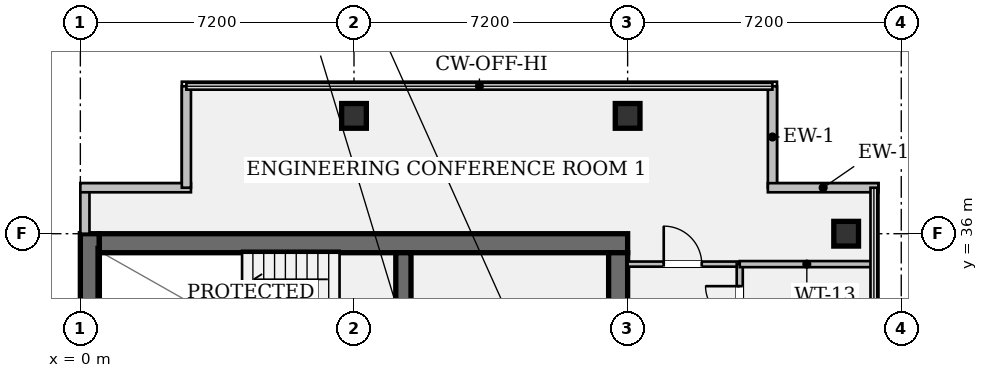
"""IFC4 building model, lengths in metres.
Left out: names, types, materials, properties, quantities, classifications, styles, units other than length and angle.
Written with IfcOpenShell. Run it as: python <this file> out.ifc"""

import sys

from ifc_helpers import new_model, si_unit, direction, frame, frame_2d, origin, origin_2d, place, context, subcontext, project, spatial, rectangle, hollow_rectangle, extrude, element, fill, save


model = new_model("IFC4")
c1 = context("Model", 3, precision=1e-05, world=origin(), true_north=direction((0.0, 1.0)))
c2 = subcontext(c1, "Body", "Model", "MODEL_VIEW")
j1 = project(units=[si_unit("LENGTHUNIT", "METRE"), si_unit("PLANEANGLEUNIT", "RADIAN")], contexts=[c1])
p1 = place(None, origin())
s1 = spatial("IfcSite", under=j1, at=p1, CompositionType="ELEMENT")
p2 = place(p1, origin())
s2 = spatial("IfcBuilding", under=s1, at=p2, CompositionType="ELEMENT")
p3 = place(p2, frame((0.0, 0.0, 283.15)))
s3 = spatial("IfcBuildingStorey", under=s2, at=p3, CompositionType="ELEMENT", Elevation=283.15)
p4 = place(p3, frame((0.25, 7.2, 0.0), z_axis=(0.0, 0.0, 1.0), x_axis=(0.0, 1.0, 0.0)))
e1 = element("IfcWall", 1, at=p4, inside=s3, PredefinedType="SHEAR", context=c2, shape_type="SweptSolid", body=[
    extrude(rectangle(XDim=28.8, YDim=0.5, at=frame_2d((14.4, 0.0))), origin(), (0.0, 0.0, 1.0), 3.24),
])
p5 = place(p3, frame((0.5, 35.75, 0.0), z_axis=(0.0, 0.0, 1.0), x_axis=(1.0, 0.0, 0.0)))
e2 = element("IfcWall", 2, at=p5, inside=s3, PredefinedType="SHEAR", context=c2, shape_type="SweptSolid", body=[
    extrude(rectangle(XDim=13.9, YDim=0.5, at=frame_2d((6.95, 0.0))), origin(), (0.0, 0.0, 1.0), 3.24),
])
p6 = place(p3, frame((14.15, 35.5, 0.0), z_axis=(0.0, 0.0, 1.0), x_axis=(0.0, -1.0, 0.0)))
e3 = element("IfcWall", 3, at=p6, inside=s3, PredefinedType="SHEAR", context=c2, shape_type="SweptSolid", body=[
    extrude(rectangle(XDim=27.8, YDim=0.5, at=frame_2d((13.9, 0.0))), origin(), (0.0, 0.0, 1.0), 3.24),
])
p7 = place(p6, frame((1.4, 0.0, 0.0)))
e4 = element("IfcOpeningElement", 4, at=p7, cuts=e3, PredefinedType="OPENING", context=c2, shape_type="SweptSolid", body=[
    extrude(rectangle(XDim=1.2, YDim=2.15, at=frame_2d((0.6, 1.075))), frame((0.0, 0.262, 0.0), z_axis=(0.0, -1.0, 0.0), x_axis=(1.0, 0.0, 0.0)), (0.0, 0.0, 1.0), 0.524),
])
p8 = place(p6, frame((25.35, 0.0, 0.0)))
e5 = element("IfcOpeningElement", 5, at=p8, cuts=e3, PredefinedType="OPENING", context=c2, shape_type="SweptSolid", body=[
    extrude(rectangle(XDim=1.2, YDim=2.15, at=frame_2d((0.6, 1.075))), frame((0.0, 0.262, 0.0), z_axis=(0.0, -1.0, 0.0), x_axis=(1.0, 0.0, 0.0)), (0.0, 0.0, 1.0), 0.524),
])
p9 = place(p6, frame((14.7, 0.0, 0.0)))
e6 = element("IfcOpeningElement", 6, at=p9, cuts=e3, PredefinedType="OPENING", context=c2, shape_type="SweptSolid", body=[
    extrude(rectangle(XDim=1.6, YDim=2.2, at=frame_2d((0.8, 1.1))), frame((0.0, 0.262, 0.0), z_axis=(0.0, -1.0, 0.0), x_axis=(1.0, 0.0, 0.0)), (0.0, 0.0, 1.0), 0.524),
])
p10 = place(p3, frame((8.5, 31.72, 0.0), z_axis=(0.0, 0.0, 1.0), x_axis=(0.0, 1.0, 0.0)))
e7 = element("IfcWall", 7, at=p10, inside=s3, PredefinedType="SHEAR", context=c2, shape_type="SweptSolid", body=[
    extrude(rectangle(XDim=3.78, YDim=0.4, at=frame_2d((1.89, 0.0))), origin(), (0.0, 0.0, 1.0), 3.24),
])
p11 = place(p10, frame((0.9, 0.0, 0.0)))
e8 = element("IfcOpeningElement", 8, at=p11, cuts=e7, PredefinedType="OPENING", context=c2, shape_type="SweptSolid", body=[
    extrude(rectangle(XDim=1.1, YDim=2.15, at=frame_2d((0.55, 1.075))), frame((0.0, 0.212, 0.0), z_axis=(0.0, -1.0, 0.0), x_axis=(1.0, 0.0, 0.0)), (0.0, 0.0, 1.0), 0.424),
])
for number, where, z_axis, x_axis in (
    (9, (7.2, 39.1, 0.0), (0.0, 0.0, 1.0), (1.0, 0.0, 0.0)),
    (10, (14.4, 39.1, 0.0), (0.0, 0.0, 1.0), (1.0, 0.0, 0.0)),
    (11, (20.15, 36.0, 0.0), (0.0, 0.0, 1.0), (1.0, 0.0, 0.0)),
):
    element("IfcColumn", number, at=place(p3, frame(where, z_axis=z_axis, x_axis=x_axis)), inside=s3, PredefinedType="COLUMN", context=c2, shape_type="SweptSolid", body=[
        extrude(hollow_rectangle(XDim=0.65, YDim=0.65, WallThickness=0.04, at=origin_2d()), origin(), (0.0, 0.0, 1.0), 3.24),
    ])
p12 = place(p3, frame((0.12, 36.0, 0.0), z_axis=(0.0, 0.0, 1.0), x_axis=(0.0, 1.0, 0.0)))
e12 = element("IfcWall", 12, at=p12, inside=s3, PredefinedType="STANDARD", context=c2, shape_type="SweptSolid", body=[
    extrude(rectangle(XDim=1.21, YDim=0.24, at=frame_2d((0.605, 0.0))), origin(), (0.0, 0.0, 1.0), 3.24),
])
p13 = place(p3, frame((0.0, 37.21, 0.0), z_axis=(0.0, 0.0, 1.0), x_axis=(1.0, 0.0, 0.0)))
e13 = element("IfcWall", 13, at=p13, inside=s3, PredefinedType="STANDARD", context=c2, shape_type="SweptSolid", body=[
    extrude(rectangle(XDim=2.91, YDim=0.24, at=frame_2d((1.455, 0.0))), origin(), (0.0, 0.0, 1.0), 3.24),
])
for number, where, z_axis, x_axis in (
    (14, (2.79, 37.21, 0.0), (0.0, 0.0, 1.0), (0.0, 1.0, 0.0)),
    (15, (18.21, 39.88, 0.0), (0.0, 0.0, 1.0), (0.0, -1.0, 0.0)),
):
    element("IfcWall", number, at=place(p3, frame(where, z_axis=z_axis, x_axis=x_axis)), inside=s3, PredefinedType="STANDARD", context=c2, shape_type="SweptSolid", body=[
        extrude(rectangle(XDim=2.67, YDim=0.24, at=frame_2d((1.335, 0.0))), origin(), (0.0, 0.0, 1.0), 3.24),
    ])
p14 = place(p3, frame((18.09, 37.21, 0.0), z_axis=(0.0, 0.0, 1.0), x_axis=(1.0, 0.0, 0.0)))
e16 = element("IfcWall", 16, at=p14, inside=s3, PredefinedType="STANDARD", context=c2, shape_type="SweptSolid", body=[
    extrude(rectangle(XDim=2.91, YDim=0.24, at=frame_2d((1.455, 0.0))), origin(), (0.0, 0.0, 1.0), 3.24),
])
p15 = place(p3, frame((14.4, 35.2, 0.0), z_axis=(0.0, 0.0, 1.0), x_axis=(1.0, 0.0, 0.0)))
e17 = element("IfcWall", 17, at=p15, inside=s3, PredefinedType="PARTITIONING", context=c2, shape_type="SweptSolid", body=[
    extrude(rectangle(XDim=2.95, YDim=0.135, at=frame_2d((1.475, 0.0))), origin(), (0.0, 0.0, 1.0), 2.808),
])
p16 = place(p15, frame((0.95, 0.0, 0.0)))
e18 = element("IfcOpeningElement", 18, at=p16, cuts=e17, PredefinedType="OPENING", context=c2, shape_type="SweptSolid", body=[
    extrude(rectangle(XDim=1.0, YDim=2.15, at=frame_2d((0.5, 1.075))), frame((0.0, 0.08, 0.0), z_axis=(0.0, -1.0, 0.0), x_axis=(1.0, 0.0, 0.0)), (0.0, 0.0, 1.0), 0.159),
])
p17 = place(p3, frame((17.35, 17.75, 0.0), z_axis=(0.0, 0.0, 1.0), x_axis=(0.0, 1.0, 0.0)))
e19 = element("IfcWall", 19, at=p17, inside=s3, PredefinedType="PARTITIONING", context=c2, shape_type="SweptSolid", body=[
    extrude(rectangle(XDim=17.45, YDim=0.16, at=frame_2d((8.725, 0.0))), origin(), (0.0, 0.0, 1.0), 2.676),
])
p18 = place(p17, frame((6.23, 0.0, 0.0)))
e20 = element("IfcOpeningElement", 20, at=p18, cuts=e19, PredefinedType="OPENING", context=c2, shape_type="SweptSolid", body=[
    extrude(rectangle(XDim=0.9, YDim=2.15, at=frame_2d((0.45, 1.075))), frame((0.0, 0.092, 0.0), z_axis=(0.0, -1.0, 0.0), x_axis=(1.0, 0.0, 0.0)), (0.0, 0.0, 1.0), 0.184),
])
p19 = place(p17, frame((9.48, 0.0, 0.0)))
e21 = element("IfcOpeningElement", 21, at=p19, cuts=e19, PredefinedType="OPENING", context=c2, shape_type="SweptSolid", body=[
    extrude(rectangle(XDim=0.9, YDim=2.15, at=frame_2d((0.45, 1.075))), frame((0.0, 0.092, 0.0), z_axis=(0.0, -1.0, 0.0), x_axis=(1.0, 0.0, 0.0)), (0.0, 0.0, 1.0), 0.184),
])
p20 = place(p17, frame((12.73, 0.0, 0.0)))
e22 = element("IfcOpeningElement", 22, at=p20, cuts=e19, PredefinedType="OPENING", context=c2, shape_type="SweptSolid", body=[
    extrude(rectangle(XDim=0.9, YDim=2.15, at=frame_2d((0.45, 1.075))), frame((0.0, 0.092, 0.0), z_axis=(0.0, -1.0, 0.0), x_axis=(1.0, 0.0, 0.0)), (0.0, 0.0, 1.0), 0.184),
])
p21 = place(p17, frame((15.97, 0.0, 0.0)))
e23 = element("IfcOpeningElement", 23, at=p21, cuts=e19, PredefinedType="OPENING", context=c2, shape_type="SweptSolid", body=[
    extrude(rectangle(XDim=0.9, YDim=2.15, at=frame_2d((0.45, 1.075))), frame((0.0, 0.092, 0.0), z_axis=(0.0, -1.0, 0.0), x_axis=(1.0, 0.0, 0.0)), (0.0, 0.0, 1.0), 0.184),
])
p22 = place(p3, frame((17.35, 35.2, 0.0), z_axis=(0.0, 0.0, 1.0), x_axis=(1.0, 0.0, 0.0)))
e24 = element("IfcWall", 24, at=p22, inside=s3, PredefinedType="PARTITIONING", context=c2, shape_type="SweptSolid", body=[
    extrude(rectangle(XDim=3.53, YDim=0.16, at=frame_2d((1.765, 0.0))), origin(), (0.0, 0.0, 1.0), 2.808),
])
p23 = place(p3, frame((20.9, 22.7, 0.0), z_axis=(0.0, 0.0, 1.0), x_axis=(0.0, 1.0, 0.0)))
e25 = element("IfcWall", 25, at=p23, inside=s3, PredefinedType="PARTITIONING", context=c2, shape_type="SweptSolid", body=[
    extrude(rectangle(XDim=12.5, YDim=0.135, at=frame_2d((6.25, 0.0))), origin(), (0.0, 0.0, 1.0), 3.24),
])
p24 = place(p16, origin())
e26 = element("IfcDoor", 26, at=p24, inside=s3, OperationType="SINGLE_SWING_LEFT", PredefinedType="DOOR", context=c2, shape_type="SweptSolid", body=[
    extrude(rectangle(XDim=1.0, YDim=2.15, at=frame_2d((0.5, 1.075))), frame((0.0, 0.025, 0.0), z_axis=(0.0, -1.0, 0.0), x_axis=(1.0, 0.0, 0.0)), (0.0, 0.0, 1.0), 0.05),
])
fill(e18, e26)
p25 = place(p21, origin())
e27 = element("IfcDoor", 27, at=p25, inside=s3, OperationType="SINGLE_SWING_RIGHT", PredefinedType="DOOR", context=c2, shape_type="SweptSolid", body=[
    extrude(rectangle(XDim=0.9, YDim=2.15, at=frame_2d((0.45, 1.075))), frame((0.0, 0.025, 0.0), z_axis=(0.0, -1.0, 0.0), x_axis=(1.0, 0.0, 0.0)), (0.0, 0.0, 1.0), 0.05),
])
fill(e23, e27)
save(model, sys.argv[1])
